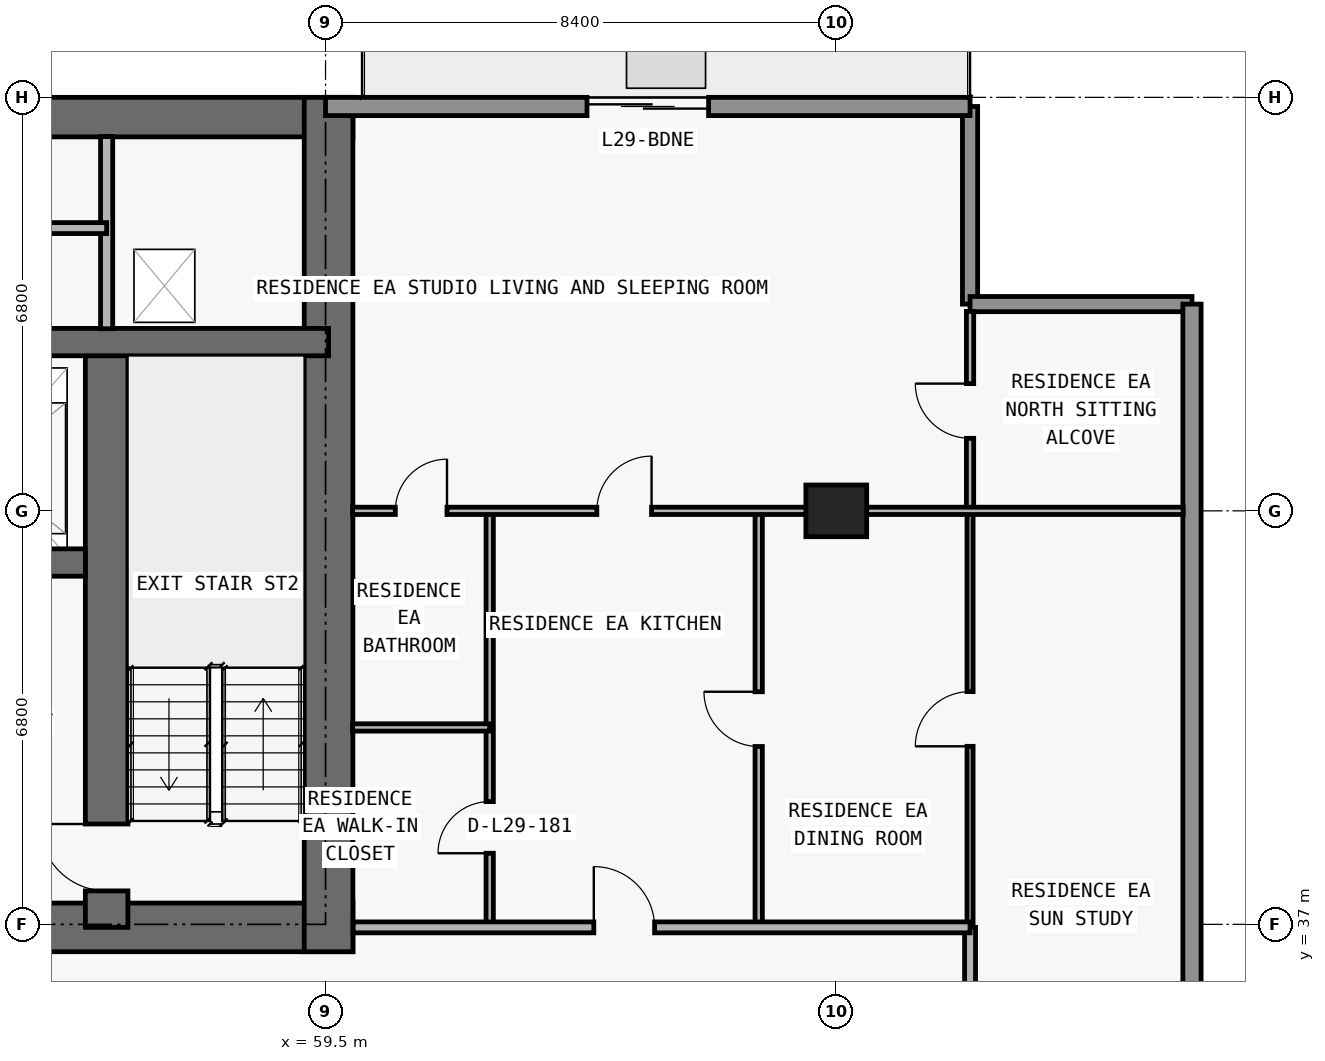
"""IFC4 building model, lengths in metres.
Left out: names, types, materials, properties, quantities, classifications, styles, units other than length and angle.
Written with IfcOpenShell. Run it as: python <this file> out.ifc"""

import sys

from ifc_helpers import new_model, si_unit, direction, frame, frame_2d, origin, origin_2d, place, context, subcontext, project, spatial, rectangle, extrude, element, fill, save


model = new_model("IFC4")
c1 = context("Model", 3, precision=1e-05, world=origin(), true_north=direction((0.0, 1.0)))
c2 = subcontext(c1, "Body", "Model", "MODEL_VIEW")
j1 = project(units=[si_unit("LENGTHUNIT", "METRE"), si_unit("PLANEANGLEUNIT", "RADIAN")], contexts=[c1])
p1 = place(None, origin())
s1 = spatial("IfcSite", under=j1, at=p1, CompositionType="ELEMENT")
p2 = place(p1, origin())
s2 = spatial("IfcBuilding", under=s1, at=p2, CompositionType="ELEMENT")
p3 = place(p2, frame((0.0, 0.0, 109.2)))
s3 = spatial("IfcBuildingStorey", under=s2, at=p3, CompositionType="ELEMENT", Elevation=109.2)
p4 = place(p3, frame((67.9, 43.8, 0.0), z_axis=(0.0, 0.0, 1.0), x_axis=(1.0, 0.0, 0.0)))
e1 = element("IfcColumn", 1, at=p4, inside=s3, PredefinedType="COLUMN", context=c2, shape_type="SweptSolid", body=[
    extrude(rectangle(XDim=1.0, YDim=0.85, at=origin_2d()), origin(), (0.0, 0.0, 1.0), 3.05),
])
p5 = place(p3, frame((17.85, 36.95, 0.0), z_axis=(0.0, 0.0, 1.0), x_axis=(1.0, 0.0, 0.0)))
e2 = element("IfcWall", 2, at=p5, inside=s3, PredefinedType="SHEAR", context=c2, shape_type="SweptSolid", body=[
    extrude(rectangle(XDim=42.1, YDim=0.8, at=frame_2d((21.05, 0.0))), origin(), (0.0, 0.0, 1.0), 3.05),
])
p6 = place(p5, frame((14.45, 0.0, 0.0)))
e3 = element("IfcOpeningElement", 3, at=p6, cuts=e2, PredefinedType="OPENING", context=c2, shape_type="SweptSolid", body=[
    extrude(rectangle(XDim=1.1, YDim=2.15, at=frame_2d((0.55, 1.075))), frame((0.0, 0.41, 0.0), z_axis=(0.0, -1.0, 0.0), x_axis=(1.0, 0.0, 0.0)), (0.0, 0.0, 1.0), 0.82),
])
p7 = place(p5, frame((6.3, 0.0, 0.0)))
e4 = element("IfcOpeningElement", 4, at=p7, cuts=e2, PredefinedType="OPENING", context=c2, shape_type="SweptSolid", body=[
    extrude(rectangle(XDim=1.05, YDim=2.15, at=frame_2d((0.525, 1.075))), frame((0.0, 0.41, 0.0), z_axis=(0.0, -1.0, 0.0), x_axis=(1.0, 0.0, 0.0)), (0.0, 0.0, 1.0), 0.82),
])
p8 = place(p5, frame((34.8, 0.0, 0.0)))
e5 = element("IfcOpeningElement", 5, at=p8, cuts=e2, PredefinedType="OPENING", context=c2, shape_type="SweptSolid", body=[
    extrude(rectangle(XDim=1.05, YDim=2.15, at=frame_2d((0.525, 1.075))), frame((0.0, 0.41, 0.0), z_axis=(0.0, -1.0, 0.0), x_axis=(1.0, 0.0, 0.0)), (0.0, 0.0, 1.0), 0.82),
])
p9 = place(p5, frame((10.913, 0.0, 0.0)))
e6 = element("IfcOpeningElement", 6, at=p9, cuts=e2, PredefinedType="OPENING", context=c2, shape_type="SweptSolid", body=[
    extrude(rectangle(XDim=1.05, YDim=2.15, at=frame_2d((0.525, 1.075))), frame((0.0, 0.41, 0.0), z_axis=(0.0, -1.0, 0.0), x_axis=(1.0, 0.0, 0.0)), (0.0, 0.0, 1.0), 0.82),
])
p10 = place(p5, frame((24.15, 0.0, 0.0)))
e7 = element("IfcOpeningElement", 7, at=p10, cuts=e2, PredefinedType="OPENING", context=c2, shape_type="SweptSolid", body=[
    extrude(rectangle(XDim=1.05, YDim=2.15, at=frame_2d((0.525, 1.075))), frame((0.0, 0.41, 0.0), z_axis=(0.0, -1.0, 0.0), x_axis=(1.0, 0.0, 0.0)), (0.0, 0.0, 1.0), 0.82),
])
p11 = place(p3, frame((17.85, 50.275, 0.0), z_axis=(0.0, 0.0, 1.0), x_axis=(1.0, 0.0, 0.0)))
e8 = element("IfcWall", 8, at=p11, inside=s3, PredefinedType="SHEAR", context=c2, shape_type="SweptSolid", body=[
    extrude(rectangle(XDim=42.1, YDim=0.65, at=frame_2d((21.05, 0.0))), origin(), (0.0, 0.0, 1.0), 3.05),
])
p12 = place(p3, frame((59.55, 36.55, 0.0), z_axis=(0.0, 0.0, 1.0), x_axis=(0.0, 1.0, 0.0)))
e9 = element("IfcWall", 9, at=p12, inside=s3, PredefinedType="SHEAR", context=c2, shape_type="SweptSolid", body=[
    extrude(rectangle(XDim=14.05, YDim=0.8, at=frame_2d((7.025, 0.0))), origin(), (0.0, 0.0, 1.0), 3.05),
])
p13 = place(p3, frame((55.9, 36.95, 0.0), z_axis=(0.0, 0.0, 1.0), x_axis=(0.0, 1.0, 0.0)))
e10 = element("IfcWall", 10, at=p13, inside=s3, PredefinedType="SHEAR", context=c2, shape_type="SweptSolid", body=[
    extrude(rectangle(XDim=9.625, YDim=0.7, at=frame_2d((4.812, 0.0))), origin(), (0.0, 0.0, 1.0), 3.05),
])
p14 = place(p13, frame((0.6, 0.0, 0.0)))
e11 = element("IfcOpeningElement", 11, at=p14, cuts=e10, PredefinedType="OPENING", context=c2, shape_type="SweptSolid", body=[
    extrude(rectangle(XDim=1.1, YDim=2.15, at=frame_2d((0.55, 1.075))), frame((0.0, 0.36, 0.0), z_axis=(0.0, -1.0, 0.0), x_axis=(1.0, 0.0, 0.0)), (0.0, 0.0, 1.0), 0.72),
])
p15 = place(p3, frame((22.25, 42.95, 0.0), z_axis=(0.0, 0.0, 1.0), x_axis=(1.0, 0.0, 0.0)))
e12 = element("IfcWall", 12, at=p15, inside=s3, PredefinedType="SHEAR", context=c2, shape_type="SweptSolid", body=[
    extrude(rectangle(XDim=33.3, YDim=0.45, at=frame_2d((16.65, 0.0))), origin(), (0.0, 0.0, 1.0), 3.05),
])
p16 = place(p15, frame((1.05, 0.0, 0.0)))
e13 = element("IfcOpeningElement", 13, at=p16, cuts=e12, PredefinedType="OPENING", context=c2, shape_type="SweptSolid", body=[
    extrude(rectangle(XDim=1.2, YDim=2.2, at=frame_2d((0.6, 1.1))), frame((0.0, 0.235, 0.0), z_axis=(0.0, -1.0, 0.0), x_axis=(1.0, 0.0, 0.0)), (0.0, 0.0, 1.0), 0.47),
])
p17 = place(p15, frame((31.05, 0.0, 0.0)))
e14 = element("IfcOpeningElement", 14, at=p17, cuts=e12, PredefinedType="OPENING", context=c2, shape_type="SweptSolid", body=[
    extrude(rectangle(XDim=1.2, YDim=2.2, at=frame_2d((0.6, 1.1))), frame((0.0, 0.235, 0.0), z_axis=(0.0, -1.0, 0.0), x_axis=(1.0, 0.0, 0.0)), (0.0, 0.0, 1.0), 0.47),
])
p18 = place(p15, frame((21.4, 0.0, 0.0)))
e15 = element("IfcOpeningElement", 15, at=p18, cuts=e12, PredefinedType="OPENING", context=c2, shape_type="SweptSolid", body=[
    extrude(rectangle(XDim=1.1, YDim=2.2, at=frame_2d((0.55, 1.1))), frame((0.0, 0.235, 0.0), z_axis=(0.0, -1.0, 0.0), x_axis=(1.0, 0.0, 0.0)), (0.0, 0.0, 1.0), 0.47),
])
p19 = place(p15, frame((24.0, 0.0, 0.0)))
e16 = element("IfcOpeningElement", 16, at=p19, cuts=e12, PredefinedType="OPENING", context=c2, shape_type="SweptSolid", body=[
    extrude(rectangle(XDim=1.1, YDim=2.2, at=frame_2d((0.55, 1.1))), frame((0.0, 0.235, 0.0), z_axis=(0.0, -1.0, 0.0), x_axis=(1.0, 0.0, 0.0)), (0.0, 0.0, 1.0), 0.47),
])
p20 = place(p15, frame((3.625, 0.0, 0.0)))
e17 = element("IfcOpeningElement", 17, at=p20, cuts=e12, PredefinedType="OPENING", context=c2, shape_type="SweptSolid", body=[
    extrude(rectangle(XDim=1.05, YDim=2.15, at=frame_2d((0.525, 1.075))), frame((0.0, 0.235, 0.0), z_axis=(0.0, -1.0, 0.0), x_axis=(1.0, 0.0, 0.0)), (0.0, 0.0, 1.0), 0.47),
])
p21 = place(p15, frame((28.675, 0.0, 0.0)))
e18 = element("IfcOpeningElement", 18, at=p21, cuts=e12, PredefinedType="OPENING", context=c2, shape_type="SweptSolid", body=[
    extrude(rectangle(XDim=1.05, YDim=2.15, at=frame_2d((0.525, 1.075))), frame((0.0, 0.235, 0.0), z_axis=(0.0, -1.0, 0.0), x_axis=(1.0, 0.0, 0.0)), (0.0, 0.0, 1.0), 0.47),
])
p22 = place(p15, frame((13.925, 0.0, 0.0)))
e19 = element("IfcOpeningElement", 19, at=p22, cuts=e12, PredefinedType="OPENING", context=c2, shape_type="SweptSolid", body=[
    extrude(rectangle(XDim=1.0, YDim=2.2, at=frame_2d((0.5, 1.1))), frame((0.0, 0.235, 0.0), z_axis=(0.0, -1.0, 0.0), x_axis=(1.0, 0.0, 0.0)), (0.0, 0.0, 1.0), 0.47),
])
p23 = place(p15, frame((18.05, 0.0, 0.0)))
e20 = element("IfcOpeningElement", 20, at=p23, cuts=e12, PredefinedType="OPENING", context=c2, shape_type="SweptSolid", body=[
    extrude(rectangle(XDim=1.0, YDim=2.2, at=frame_2d((0.5, 1.1))), frame((0.0, 0.235, 0.0), z_axis=(0.0, -1.0, 0.0), x_axis=(1.0, 0.0, 0.0)), (0.0, 0.0, 1.0), 0.47),
])
p24 = place(p3, frame((18.25, 46.575, 0.0), z_axis=(0.0, 0.0, 1.0), x_axis=(1.0, 0.0, 0.0)))
e21 = element("IfcWall", 21, at=p24, inside=s3, PredefinedType="SHEAR", context=c2, shape_type="SweptSolid", body=[
    extrude(rectangle(XDim=41.3, YDim=0.45, at=frame_2d((20.65, 0.0))), origin(), (0.0, 0.0, 1.0), 3.05),
])
p25 = place(p24, frame((7.625, 0.0, 0.0)))
e22 = element("IfcOpeningElement", 22, at=p25, cuts=e21, PredefinedType="OPENING", context=c2, shape_type="SweptSolid", body=[
    extrude(rectangle(XDim=1.05, YDim=2.15, at=frame_2d((0.525, 1.075))), frame((0.0, 0.235, 0.0), z_axis=(0.0, -1.0, 0.0), x_axis=(1.0, 0.0, 0.0)), (0.0, 0.0, 1.0), 0.47),
])
p26 = place(p24, frame((32.675, 0.0, 0.0)))
e23 = element("IfcOpeningElement", 23, at=p26, cuts=e21, PredefinedType="OPENING", context=c2, shape_type="SweptSolid", body=[
    extrude(rectangle(XDim=1.05, YDim=2.15, at=frame_2d((0.525, 1.075))), frame((0.0, 0.235, 0.0), z_axis=(0.0, -1.0, 0.0), x_axis=(1.0, 0.0, 0.0)), (0.0, 0.0, 1.0), 0.47),
])
p27 = place(p3, frame((70.1, 50.45, 0.0), z_axis=(0.0, 0.0, 1.0), x_axis=(0.0, -1.0, 0.0)))
e24 = element("IfcWall", 24, at=p27, inside=s3, PredefinedType="ELEMENTEDWALL", context=c2, shape_type="SweptSolid", body=[
    extrude(rectangle(XDim=3.25, YDim=0.25, at=frame_2d((1.625, 0.0))), origin(), (0.0, 0.0, 1.0), 3.05),
])
p28 = place(p3, frame((70.1, 47.2, 0.0), z_axis=(0.0, 0.0, 1.0), x_axis=(1.0, 0.0, 0.0)))
e25 = element("IfcWall", 25, at=p28, inside=s3, PredefinedType="ELEMENTEDWALL", context=c2, shape_type="SweptSolid", body=[
    extrude(rectangle(XDim=3.65, YDim=0.25, at=frame_2d((1.825, 0.0))), origin(), (0.0, 0.0, 1.0), 3.05),
])
p29 = place(p3, frame((73.75, 47.2, 0.0), z_axis=(0.0, 0.0, 1.0), x_axis=(0.0, -1.0, 0.0)))
e26 = element("IfcWall", 26, at=p29, inside=s3, PredefinedType="STANDARD", context=c2, shape_type="SweptSolid", body=[
    extrude(rectangle(XDim=19.2, YDim=0.3, at=frame_2d((9.6, 0.0))), origin(), (0.0, 0.0, 1.0), 3.05),
])
p30 = place(p3, frame((59.5, 50.45, 0.0), z_axis=(0.0, 0.0, 1.0), x_axis=(1.0, 0.0, 0.0)))
e27 = element("IfcWall", 27, at=p30, inside=s3, PredefinedType="STANDARD", context=c2, shape_type="SweptSolid", body=[
    extrude(rectangle(XDim=10.6, YDim=0.3, at=frame_2d((5.3, 0.0))), origin(), (0.0, 0.0, 1.0), 3.05),
])
p31 = place(p30, frame((4.3, 0.0, 0.0)))
e28 = element("IfcOpeningElement", 28, at=p31, cuts=e27, PredefinedType="OPENING", context=c2, shape_type="SweptSolid", body=[
    extrude(rectangle(XDim=2.0, YDim=2.3, at=frame_2d((1.0, 1.15))), frame((0.0, 0.16, 0.0), z_axis=(0.0, -1.0, 0.0), x_axis=(1.0, 0.0, 0.0)), (0.0, 0.0, 1.0), 0.32),
])
p32 = place(p3, frame((55.9, 46.795, 0.0), z_axis=(0.0, 0.0, 1.0), x_axis=(0.0, 1.0, 0.0)))
e29 = element("IfcWall", 29, at=p32, inside=s3, PredefinedType="PARTITIONING", context=c2, shape_type="SweptSolid", body=[
    extrude(rectangle(XDim=3.16, YDim=0.2, at=frame_2d((1.58, 0.0))), origin(), (0.0, 0.0, 1.0), 3.05),
])
p33 = place(p3, frame((62.2, 36.95, 0.0), z_axis=(0.0, 0.0, 1.0), x_axis=(0.0, 1.0, 0.0)))
e30 = element("IfcWall", 30, at=p33, inside=s3, PredefinedType="PARTITIONING", context=c2, shape_type="SweptSolid", body=[
    extrude(rectangle(XDim=6.85, YDim=0.12, at=frame_2d((3.425, 0.0))), origin(), (0.0, 0.0, 1.0), 3.05),
])
p34 = place(p33, frame((1.219, 0.0, 0.0)))
e31 = element("IfcOpeningElement", 31, at=p34, cuts=e30, PredefinedType="OPENING", context=c2, shape_type="SweptSolid", body=[
    extrude(rectangle(XDim=0.85, YDim=2.1, at=frame_2d((0.425, 1.05))), frame((0.0, 0.07, 0.0), z_axis=(0.0, -1.0, 0.0), x_axis=(1.0, 0.0, 0.0)), (0.0, 0.0, 1.0), 0.14),
])
p35 = place(p3, frame((66.624, 36.95, 0.0), z_axis=(0.0, 0.0, 1.0), x_axis=(0.0, 1.0, 0.0)))
e32 = element("IfcWall", 32, at=p35, inside=s3, PredefinedType="PARTITIONING", context=c2, shape_type="SweptSolid", body=[
    extrude(rectangle(XDim=6.85, YDim=0.12, at=frame_2d((3.425, 0.0))), origin(), (0.0, 0.0, 1.0), 3.05),
])
p36 = place(p35, frame((2.975, 0.0, 0.0)))
e33 = element("IfcOpeningElement", 33, at=p36, cuts=e32, PredefinedType="OPENING", context=c2, shape_type="SweptSolid", body=[
    extrude(rectangle(XDim=0.9, YDim=2.15, at=frame_2d((0.45, 1.075))), frame((0.0, 0.07, 0.0), z_axis=(0.0, -1.0, 0.0), x_axis=(1.0, 0.0, 0.0)), (0.0, 0.0, 1.0), 0.14),
])
p37 = place(p3, frame((70.1, 34.605, 0.0), z_axis=(0.0, 0.0, 1.0), x_axis=(0.0, 1.0, 0.0)))
e34 = element("IfcWall", 34, at=p37, inside=s3, PredefinedType="PARTITIONING", context=c2, shape_type="SweptSolid", body=[
    extrude(rectangle(XDim=2.345, YDim=0.18, at=frame_2d((1.172, 0.0))), origin(), (0.0, 0.0, 1.0), 3.05),
])
p38 = place(p3, frame((70.1, 36.955, 0.0), z_axis=(0.0, 0.0, 1.0), x_axis=(0.0, 1.0, 0.0)))
e35 = element("IfcWall", 35, at=p38, inside=s3, PredefinedType="MOVABLE", context=c2, shape_type="SweptSolid", body=[
    extrude(rectangle(XDim=6.845, YDim=0.1, at=frame_2d((3.422, 0.0))), origin(), (0.0, 0.0, 1.0), 3.05),
])
p39 = place(p38, frame((2.972, 0.0, 0.0)))
e36 = element("IfcOpeningElement", 36, at=p39, cuts=e35, PredefinedType="OPENING", context=c2, shape_type="SweptSolid", body=[
    extrude(rectangle(XDim=0.9, YDim=2.15, at=frame_2d((0.45, 1.075))), frame((0.0, 0.06, 0.0), z_axis=(0.0, -1.0, 0.0), x_axis=(1.0, 0.0, 0.0)), (0.0, 0.0, 1.0), 0.12),
])
p40 = place(p3, frame((70.1, 43.805, 0.0), z_axis=(0.0, 0.0, 1.0), x_axis=(0.0, 1.0, 0.0)))
e37 = element("IfcWall", 37, at=p40, inside=s3, PredefinedType="PARTITIONING", context=c2, shape_type="SweptSolid", body=[
    extrude(rectangle(XDim=3.275, YDim=0.12, at=frame_2d((1.638, 0.0))), origin(), (0.0, 0.0, 1.0), 3.05),
])
p41 = place(p40, frame((1.188, 0.0, 0.0)))
e38 = element("IfcOpeningElement", 38, at=p41, cuts=e37, PredefinedType="OPENING", context=c2, shape_type="SweptSolid", body=[
    extrude(rectangle(XDim=0.9, YDim=2.15, at=frame_2d((0.45, 1.075))), frame((0.0, 0.07, 0.0), z_axis=(0.0, -1.0, 0.0), x_axis=(1.0, 0.0, 0.0)), (0.0, 0.0, 1.0), 0.14),
])
p42 = place(p3, frame((59.955, 36.95, 0.0), z_axis=(0.0, 0.0, 1.0), x_axis=(1.0, 0.0, 0.0)))
e39 = element("IfcWall", 39, at=p42, inside=s3, PredefinedType="PARTITIONING", context=c2, shape_type="SweptSolid", body=[
    extrude(rectangle(XDim=10.145, YDim=0.18, at=frame_2d((5.073, 0.0))), origin(), (0.0, 0.0, 1.0), 3.05),
])
p43 = place(p42, frame((3.957, 0.0, 0.0)))
e40 = element("IfcOpeningElement", 40, at=p43, cuts=e39, PredefinedType="OPENING", context=c2, shape_type="SweptSolid", body=[
    extrude(rectangle(XDim=1.0, YDim=2.2, at=frame_2d((0.5, 1.1))), frame((0.0, 0.1, 0.0), z_axis=(0.0, -1.0, 0.0), x_axis=(1.0, 0.0, 0.0)), (0.0, 0.0, 1.0), 0.2),
])
p44 = place(p3, frame((59.945, 40.238, 0.0), z_axis=(0.0, 0.0, 1.0), x_axis=(1.0, 0.0, 0.0)))
e41 = element("IfcWall", 41, at=p44, inside=s3, PredefinedType="PARTITIONING", context=c2, shape_type="SweptSolid", body=[
    extrude(rectangle(XDim=2.255, YDim=0.12, at=frame_2d((1.127, 0.0))), origin(), (0.0, 0.0, 1.0), 3.05),
])
p45 = place(p3, frame((59.945, 43.8, 0.0), z_axis=(0.0, 0.0, 1.0), x_axis=(1.0, 0.0, 0.0)))
e42 = element("IfcWall", 42, at=p45, inside=s3, PredefinedType="PARTITIONING", context=c2, shape_type="SweptSolid", body=[
    extrude(rectangle(XDim=13.66, YDim=0.12, at=frame_2d((6.83, 0.0))), origin(), (0.0, 0.0, 1.0), 2.339),
])
p46 = place(p45, frame((4.017, 0.0, 0.0)))
e43 = element("IfcOpeningElement", 43, at=p46, cuts=e42, PredefinedType="OPENING", context=c2, shape_type="SweptSolid", body=[
    extrude(rectangle(XDim=0.9, YDim=2.15, at=frame_2d((0.45, 1.075))), frame((0.0, 0.07, 0.0), z_axis=(0.0, -1.0, 0.0), x_axis=(1.0, 0.0, 0.0)), (0.0, 0.0, 1.0), 0.14),
])
p47 = place(p45, frame((0.702, 0.0, 0.0)))
e44 = element("IfcOpeningElement", 44, at=p47, cuts=e42, PredefinedType="OPENING", context=c2, shape_type="SweptSolid", body=[
    extrude(rectangle(XDim=0.85, YDim=2.1, at=frame_2d((0.425, 1.05))), frame((0.0, 0.07, 0.0), z_axis=(0.0, -1.0, 0.0), x_axis=(1.0, 0.0, 0.0)), (0.0, 0.0, 1.0), 0.14),
])
p48 = place(p3, frame((26.7, 48.45, 0.0), z_axis=(0.0, 0.0, 1.0), x_axis=(1.0, 0.0, 0.0)))
e45 = element("IfcWall", 45, at=p48, inside=s3, PredefinedType="PARTITIONING", context=c2, shape_type="SweptSolid", body=[
    extrude(rectangle(XDim=29.2, YDim=0.18, at=frame_2d((14.6, 0.0))), origin(), (0.0, 0.0, 1.0), 3.05),
])
p49 = place(p48, frame((1.75, 0.0, 0.0)))
e46 = element("IfcOpeningElement", 46, at=p49, cuts=e45, PredefinedType="OPENING", context=c2, shape_type="SweptSolid", body=[
    extrude(rectangle(XDim=1.2, YDim=2.2, at=frame_2d((0.6, 1.1))), frame((0.0, 0.1, 0.0), z_axis=(0.0, -1.0, 0.0), x_axis=(1.0, 0.0, 0.0)), (0.0, 0.0, 1.0), 0.2),
])
p50 = place(p48, frame((6.475, 0.0, 0.0)))
e47 = element("IfcOpeningElement", 47, at=p50, cuts=e45, PredefinedType="OPENING", context=c2, shape_type="SweptSolid", body=[
    extrude(rectangle(XDim=1.2, YDim=2.2, at=frame_2d((0.6, 1.1))), frame((0.0, 0.1, 0.0), z_axis=(0.0, -1.0, 0.0), x_axis=(1.0, 0.0, 0.0)), (0.0, 0.0, 1.0), 0.2),
])
p51 = place(p48, frame((14.05, 0.0, 0.0)))
e48 = element("IfcOpeningElement", 48, at=p51, cuts=e45, PredefinedType="OPENING", context=c2, shape_type="SweptSolid", body=[
    extrude(rectangle(XDim=1.0, YDim=2.2, at=frame_2d((0.5, 1.1))), frame((0.0, 0.1, 0.0), z_axis=(0.0, -1.0, 0.0), x_axis=(1.0, 0.0, 0.0)), (0.0, 0.0, 1.0), 0.2),
])
p52 = place(p48, frame((21.425, 0.0, 0.0)))
e49 = element("IfcOpeningElement", 49, at=p52, cuts=e45, PredefinedType="OPENING", context=c2, shape_type="SweptSolid", body=[
    extrude(rectangle(XDim=1.2, YDim=2.2, at=frame_2d((0.6, 1.1))), frame((0.0, 0.1, 0.0), z_axis=(0.0, -1.0, 0.0), x_axis=(1.0, 0.0, 0.0)), (0.0, 0.0, 1.0), 0.2),
])
p53 = place(p48, frame((26.375, 0.0, 0.0)))
e50 = element("IfcOpeningElement", 50, at=p53, cuts=e45, PredefinedType="OPENING", context=c2, shape_type="SweptSolid", body=[
    extrude(rectangle(XDim=0.85, YDim=2.1, at=frame_2d((0.425, 1.05))), frame((0.0, 0.1, 0.0), z_axis=(0.0, -1.0, 0.0), x_axis=(1.0, 0.0, 0.0)), (0.0, 0.0, 1.0), 0.2),
])
p54 = place(p31, origin())
e51 = element("IfcDoor", 51, at=p54, inside=s3, OperationType="DOUBLE_DOOR_SLIDING", PredefinedType="DOOR", context=c2, shape_type="SweptSolid", body=[
    extrude(rectangle(XDim=2.0, YDim=2.3, at=frame_2d((1.0, 1.15))), frame((0.0, 0.025, 0.0), z_axis=(0.0, -1.0, 0.0), x_axis=(1.0, 0.0, 0.0)), (0.0, 0.0, 1.0), 0.05),
])
fill(e28, e51)
p55 = place(p14, origin())
e52 = element("IfcDoor", 52, at=p55, inside=s3, OperationType="SINGLE_SWING_RIGHT", PredefinedType="DOOR", context=c2, shape_type="SweptSolid", body=[
    extrude(rectangle(XDim=1.1, YDim=2.15, at=frame_2d((0.55, 1.075))), frame((0.0, 0.025, 0.0), z_axis=(0.0, -1.0, 0.0), x_axis=(1.0, 0.0, 0.0)), (0.0, 0.0, 1.0), 0.05),
])
fill(e11, e52)
p56 = place(p36, origin())
e53 = element("IfcDoor", 53, at=p56, inside=s3, OperationType="SINGLE_SWING_RIGHT", PredefinedType="DOOR", context=c2, shape_type="SweptSolid", body=[
    extrude(rectangle(XDim=0.9, YDim=2.15, at=frame_2d((0.45, 1.075))), frame((0.0, 0.025, 0.0), z_axis=(0.0, -1.0, 0.0), x_axis=(1.0, 0.0, 0.0)), (0.0, 0.0, 1.0), 0.05),
])
fill(e33, e53)
p57 = place(p43, origin())
e54 = element("IfcDoor", 54, at=p57, inside=s3, OperationType="SINGLE_SWING_LEFT", PredefinedType="DOOR", context=c2, shape_type="SweptSolid", body=[
    extrude(rectangle(XDim=1.0, YDim=2.2, at=frame_2d((0.5, 1.1))), frame((0.0, 0.025, 0.0), z_axis=(0.0, -1.0, 0.0), x_axis=(1.0, 0.0, 0.0)), (0.0, 0.0, 1.0), 0.05),
])
fill(e40, e54)
p58 = place(p46, origin())
e55 = element("IfcDoor", 55, at=p58, inside=s3, OperationType="SINGLE_SWING_RIGHT", PredefinedType="DOOR", context=c2, shape_type="SweptSolid", body=[
    extrude(rectangle(XDim=0.9, YDim=2.15, at=frame_2d((0.45, 1.075))), frame((0.0, 0.025, 0.0), z_axis=(0.0, -1.0, 0.0), x_axis=(1.0, 0.0, 0.0)), (0.0, 0.0, 1.0), 0.05),
])
fill(e43, e55)
p59 = place(p34, origin())
e56 = element("IfcDoor", 56, at=p59, inside=s3, OperationType="SINGLE_SWING_LEFT", PredefinedType="DOOR", context=c2, shape_type="SweptSolid", body=[
    extrude(rectangle(XDim=0.85, YDim=2.1, at=frame_2d((0.425, 1.05))), frame((0.0, 0.025, 0.0), z_axis=(0.0, -1.0, 0.0), x_axis=(1.0, 0.0, 0.0)), (0.0, 0.0, 1.0), 0.05),
])
fill(e31, e56)
p60 = place(p47, origin())
e57 = element("IfcDoor", 57, at=p60, inside=s3, OperationType="SINGLE_SWING_RIGHT", PredefinedType="DOOR", context=c2, shape_type="SweptSolid", body=[
    extrude(rectangle(XDim=0.85, YDim=2.1, at=frame_2d((0.425, 1.05))), frame((0.0, 0.025, 0.0), z_axis=(0.0, -1.0, 0.0), x_axis=(1.0, 0.0, 0.0)), (0.0, 0.0, 1.0), 0.05),
])
fill(e44, e57)
p61 = place(p39, origin())
e58 = element("IfcDoor", 58, at=p61, inside=s3, OperationType="SINGLE_SWING_LEFT", PredefinedType="DOOR", context=c2, shape_type="SweptSolid", body=[
    extrude(rectangle(XDim=0.9, YDim=2.15, at=frame_2d((0.45, 1.075))), frame((0.0, 0.025, 0.0), z_axis=(0.0, -1.0, 0.0), x_axis=(1.0, 0.0, 0.0)), (0.0, 0.0, 1.0), 0.05),
])
fill(e36, e58)
p62 = place(p41, origin())
e59 = element("IfcDoor", 59, at=p62, inside=s3, OperationType="SINGLE_SWING_RIGHT", PredefinedType="DOOR", context=c2, shape_type="SweptSolid", body=[
    extrude(rectangle(XDim=0.9, YDim=2.15, at=frame_2d((0.45, 1.075))), frame((0.0, 0.025, 0.0), z_axis=(0.0, -1.0, 0.0), x_axis=(1.0, 0.0, 0.0)), (0.0, 0.0, 1.0), 0.05),
])
fill(e38, e59)
save(model, sys.argv[1])
